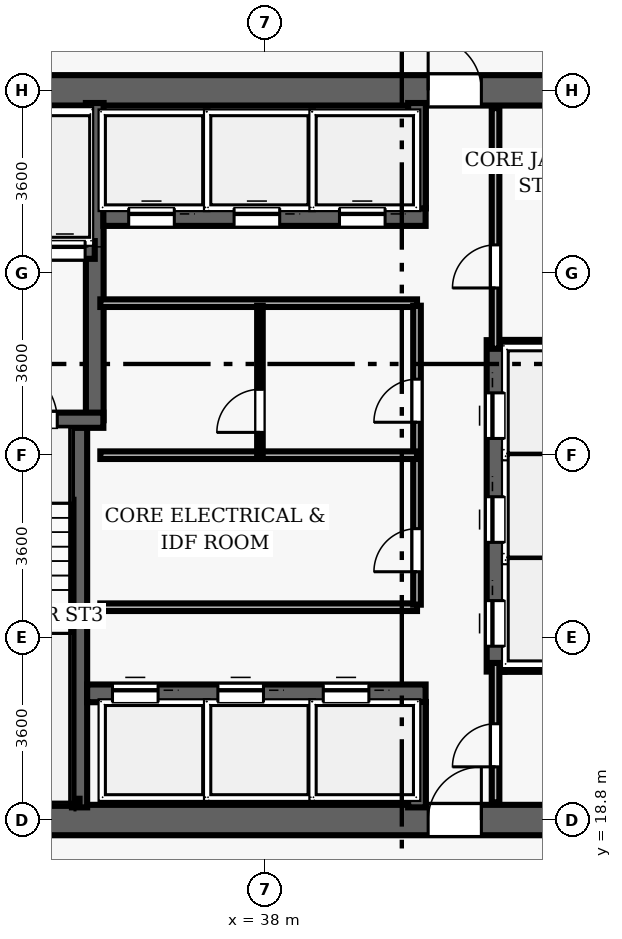
"""IFC4 building model, lengths in metres.
Left out: names, types, materials, properties, quantities, classifications, styles, units other than length and angle.
Written with IfcOpenShell. Run it as: python <this file> out.ifc"""

import sys

from ifc_helpers import new_model, si_unit, direction, frame, frame_2d, origin, place, context, subcontext, project, spatial, rectangle, extrude, element, fill, save


model = new_model("IFC4")
c1 = context("Model", 3, precision=1e-05, world=origin(), true_north=direction((0.0, 1.0)))
c2 = subcontext(c1, "Body", "Model", "MODEL_VIEW")
j1 = project(units=[si_unit("LENGTHUNIT", "METRE"), si_unit("PLANEANGLEUNIT", "RADIAN")], contexts=[c1])
p1 = place(None, origin())
s1 = spatial("IfcSite", under=j1, at=p1, CompositionType="ELEMENT")
p2 = place(p1, origin())
s2 = spatial("IfcBuilding", under=s1, at=p2, CompositionType="ELEMENT")
p3 = place(p2, origin())
s3 = spatial("IfcBuildingStorey", under=s2, at=p3, CompositionType="ELEMENT", Elevation=0.0)
p4 = place(p3, frame((26.7, 18.8, 0.0), z_axis=(0.0, 0.0, 1.0), x_axis=(1.0, 0.0, 0.0)))
e1 = element("IfcWall", 1, at=p4, inside=s3, PredefinedType="SHEAR", context=c2, shape_type="SweptSolid", body=[
    extrude(rectangle(XDim=22.6, YDim=0.6, at=frame_2d((11.3, 0.0))), origin(), (0.0, 0.0, 1.0), 6.6),
])
p5 = place(p4, frame((14.52, 0.0, 0.0)))
e2 = element("IfcOpeningElement", 2, at=p5, cuts=e1, PredefinedType="OPENING", context=c2, shape_type="SweptSolid", body=[
    extrude(rectangle(XDim=1.05, YDim=2.15, at=frame_2d((0.525, 1.075))), frame((0.0, 0.31, 0.0), z_axis=(0.0, -1.0, 0.0), x_axis=(1.0, 0.0, 0.0)), (0.0, 0.0, 1.0), 0.62),
])
p6 = place(p3, frame((26.7, 33.2, 0.0), z_axis=(0.0, 0.0, 1.0), x_axis=(1.0, 0.0, 0.0)))
e3 = element("IfcWall", 3, at=p6, inside=s3, PredefinedType="SHEAR", context=c2, shape_type="SweptSolid", body=[
    extrude(rectangle(XDim=22.6, YDim=0.6, at=frame_2d((11.3, 0.0))), origin(), (0.0, 0.0, 1.0), 6.6),
])
p7 = place(p6, frame((4.62, 0.0, 0.0)))
e4 = element("IfcOpeningElement", 4, at=p7, cuts=e3, PredefinedType="OPENING", context=c2, shape_type="SweptSolid", body=[
    extrude(rectangle(XDim=1.05, YDim=2.15, at=frame_2d((0.525, 1.075))), frame((0.0, 0.31, 0.0), z_axis=(0.0, -1.0, 0.0), x_axis=(1.0, 0.0, 0.0)), (0.0, 0.0, 1.0), 0.62),
])
p8 = place(p6, frame((14.52, 0.0, 0.0)))
e5 = element("IfcOpeningElement", 5, at=p8, cuts=e3, PredefinedType="OPENING", context=c2, shape_type="SweptSolid", body=[
    extrude(rectangle(XDim=1.05, YDim=2.15, at=frame_2d((0.525, 1.075))), frame((0.0, 0.31, 0.0), z_axis=(0.0, -1.0, 0.0), x_axis=(1.0, 0.0, 0.0)), (0.0, 0.0, 1.0), 0.62),
])
p9 = place(p3, frame((34.34, 19.05, 0.0), z_axis=(0.0, 0.0, 1.0), x_axis=(0.0, 1.0, 0.0)))
e6 = element("IfcWall", 6, at=p9, inside=s3, PredefinedType="SHEAR", context=c2, shape_type="SweptSolid", body=[
    extrude(rectangle(XDim=7.5, YDim=0.3, at=frame_2d((3.75, 0.0))), origin(), (0.0, 0.0, 1.0), 6.6),
])
p10 = place(p3, frame((34.64, 26.69, 0.0), z_axis=(0.0, 0.0, 1.0), x_axis=(0.0, 1.0, 0.0)))
e7 = element("IfcWall", 7, at=p10, inside=s3, PredefinedType="SHEAR", context=c2, shape_type="SweptSolid", body=[
    extrude(rectangle(XDim=6.26, YDim=0.35, at=frame_2d((3.13, 0.0))), origin(), (0.0, 0.0, 1.0), 6.6),
])
p11 = place(p3, frame((31.25, 26.69, 0.0), z_axis=(0.0, 0.0, 1.0), x_axis=(1.0, 0.0, 0.0)))
e8 = element("IfcWall", 8, at=p11, inside=s3, PredefinedType="SHEAR", context=c2, shape_type="SweptSolid", body=[
    extrude(rectangle(XDim=3.56, YDim=0.3, at=frame_2d((1.78, 0.0))), origin(), (0.0, 0.0, 1.0), 6.6),
])
p12 = place(p11, frame((1.55, 0.0, 0.0)))
e9 = element("IfcOpeningElement", 9, at=p12, cuts=e8, PredefinedType="OPENING", context=c2, shape_type="SweptSolid", body=[
    extrude(rectangle(XDim=1.1, YDim=2.15, at=frame_2d((0.55, 1.075))), frame((0.0, 0.16, 0.0), z_axis=(0.0, -1.0, 0.0), x_axis=(1.0, 0.0, 0.0)), (0.0, 0.0, 1.0), 0.32),
])
p13 = place(p3, frame((31.3, 19.16, 0.0), z_axis=(0.0, 0.0, 1.0), x_axis=(1.0, 0.0, 0.0)))
e10 = element("IfcWall", 10, at=p13, inside=s3, PredefinedType="SHEAR", context=c2, shape_type="SweptSolid", body=[
    extrude(rectangle(XDim=3.04, YDim=0.12, at=frame_2d((1.52, 0.0))), origin(), (0.0, 0.0, 1.0), 6.6),
])
p14 = place(p3, frame((32.23, 30.05, 0.0), z_axis=(0.0, 0.0, 1.0), x_axis=(1.0, 0.0, 0.0)))
e11 = element("IfcWall", 11, at=p14, inside=s3, PredefinedType="SHEAR", context=c2, shape_type="SweptSolid", body=[
    extrude(rectangle(XDim=2.41, YDim=0.35, at=frame_2d((1.205, 0.0))), origin(), (0.0, 0.0, 1.0), 5.31),
])
p15 = place(p14, frame((0.42, 0.0, 0.0)))
e12 = element("IfcOpeningElement", 12, at=p15, cuts=e11, PredefinedType="OPENING", context=c2, shape_type="SweptSolid", body=[
    extrude(rectangle(XDim=0.8, YDim=2.15, at=frame_2d((0.4, 1.075))), frame((0.0, 0.185, 0.0), z_axis=(0.0, -1.0, 0.0), x_axis=(1.0, 0.0, 0.0)), (0.0, 0.0, 1.0), 0.37),
])
p16 = place(p14, frame((1.42, 0.0, 0.0)))
e13 = element("IfcOpeningElement", 13, at=p16, cuts=e11, PredefinedType="OPENING", context=c2, shape_type="SweptSolid", body=[
    extrude(rectangle(XDim=0.8, YDim=2.15, at=frame_2d((0.4, 1.075))), frame((0.0, 0.185, 0.0), z_axis=(0.0, -1.0, 0.0), x_axis=(1.0, 0.0, 0.0)), (0.0, 0.0, 1.0), 0.37),
])
p17 = place(p3, frame((42.55, 21.73, 0.0), z_axis=(0.0, 0.0, 1.0), x_axis=(0.0, 1.0, 0.0)))
e14 = element("IfcWall", 14, at=p17, inside=s3, PredefinedType="SHEAR", context=c2, shape_type="SweptSolid", body=[
    extrude(rectangle(XDim=6.54, YDim=0.35, at=frame_2d((3.27, 0.0))), origin(), (0.0, 0.0, 1.0), 5.31),
])
p18 = place(p17, frame((0.5, 0.0, 0.0)))
e15 = element("IfcOpeningElement", 15, at=p18, cuts=e14, PredefinedType="OPENING", context=c2, shape_type="SweptSolid", body=[
    extrude(rectangle(XDim=0.9, YDim=2.15, at=frame_2d((0.45, 1.075))), frame((0.0, 0.185, 0.0), z_axis=(0.0, -1.0, 0.0), x_axis=(1.0, 0.0, 0.0)), (0.0, 0.0, 1.0), 0.37),
])
p19 = place(p17, frame((2.55, 0.0, 0.0)))
e16 = element("IfcOpeningElement", 16, at=p19, cuts=e14, PredefinedType="OPENING", context=c2, shape_type="SweptSolid", body=[
    extrude(rectangle(XDim=0.9, YDim=2.15, at=frame_2d((0.45, 1.075))), frame((0.0, 0.185, 0.0), z_axis=(0.0, -1.0, 0.0), x_axis=(1.0, 0.0, 0.0)), (0.0, 0.0, 1.0), 0.37),
])
p20 = place(p17, frame((4.6, 0.0, 0.0)))
e17 = element("IfcOpeningElement", 17, at=p20, cuts=e14, PredefinedType="OPENING", context=c2, shape_type="SweptSolid", body=[
    extrude(rectangle(XDim=0.9, YDim=2.15, at=frame_2d((0.45, 1.075))), frame((0.0, 0.185, 0.0), z_axis=(0.0, -1.0, 0.0), x_axis=(1.0, 0.0, 0.0)), (0.0, 0.0, 1.0), 0.37),
])
for number, where, z_axis, x_axis in (
    (18, (42.72, 21.9, 0.0), (0.0, 0.0, 1.0), (1.0, 0.0, 0.0)),
    (19, (42.72, 28.1, 0.0), (0.0, 0.0, 1.0), (1.0, 0.0, 0.0)),
):
    element("IfcWall", number, at=place(p3, frame(where, z_axis=z_axis, x_axis=x_axis)), inside=s3, PredefinedType="SHEAR", context=c2, shape_type="SweptSolid", body=[
        extrude(rectangle(XDim=2.03, YDim=0.35, at=frame_2d((1.015, 0.0))), origin(), (0.0, 0.0, 1.0), 5.31),
    ])
p21 = place(p3, frame((34.81, 30.7, 0.0), z_axis=(0.0, 0.0, 1.0), x_axis=(1.0, 0.0, 0.0)))
e20 = element("IfcWall", 20, at=p21, inside=s3, PredefinedType="SHEAR", context=c2, shape_type="SweptSolid", body=[
    extrude(rectangle(XDim=6.36, YDim=0.35, at=frame_2d((3.18, 0.0))), origin(), (0.0, 0.0, 1.0), 5.31),
])
p22 = place(p21, frame((0.5, 0.0, 0.0)))
e21 = element("IfcOpeningElement", 21, at=p22, cuts=e20, PredefinedType="OPENING", context=c2, shape_type="SweptSolid", body=[
    extrude(rectangle(XDim=0.9, YDim=2.15, at=frame_2d((0.45, 1.075))), frame((0.0, 0.185, 0.0), z_axis=(0.0, -1.0, 0.0), x_axis=(1.0, 0.0, 0.0)), (0.0, 0.0, 1.0), 0.37),
])
p23 = place(p21, frame((2.58, 0.0, 0.0)))
e22 = element("IfcOpeningElement", 22, at=p23, cuts=e20, PredefinedType="OPENING", context=c2, shape_type="SweptSolid", body=[
    extrude(rectangle(XDim=0.9, YDim=2.15, at=frame_2d((0.45, 1.075))), frame((0.0, 0.185, 0.0), z_axis=(0.0, -1.0, 0.0), x_axis=(1.0, 0.0, 0.0)), (0.0, 0.0, 1.0), 0.37),
])
p24 = place(p21, frame((4.66, 0.0, 0.0)))
e23 = element("IfcOpeningElement", 23, at=p24, cuts=e20, PredefinedType="OPENING", context=c2, shape_type="SweptSolid", body=[
    extrude(rectangle(XDim=0.9, YDim=2.15, at=frame_2d((0.45, 1.075))), frame((0.0, 0.185, 0.0), z_axis=(0.0, -1.0, 0.0), x_axis=(1.0, 0.0, 0.0)), (0.0, 0.0, 1.0), 0.37),
])
p25 = place(p3, frame((41.0, 30.87, 0.0), z_axis=(0.0, 0.0, 1.0), x_axis=(0.0, 1.0, 0.0)))
e24 = element("IfcWall", 24, at=p25, inside=s3, PredefinedType="SHEAR", context=c2, shape_type="SweptSolid", body=[
    extrude(rectangle(XDim=2.08, YDim=0.35, at=frame_2d((1.04, 0.0))), origin(), (0.0, 0.0, 1.0), 5.31),
])
p26 = place(p3, frame((34.49, 21.3, 0.0), z_axis=(0.0, 0.0, 1.0), x_axis=(1.0, 0.0, 0.0)))
e25 = element("IfcWall", 25, at=p26, inside=s3, PredefinedType="SHEAR", context=c2, shape_type="SweptSolid", body=[
    extrude(rectangle(XDim=6.68, YDim=0.35, at=frame_2d((3.34, 0.0))), origin(), (0.0, 0.0, 1.0), 5.31),
])
p27 = place(p26, frame((0.5, 0.0, 0.0)))
e26 = element("IfcOpeningElement", 26, at=p27, cuts=e25, PredefinedType="OPENING", context=c2, shape_type="SweptSolid", body=[
    extrude(rectangle(XDim=0.9, YDim=2.15, at=frame_2d((0.45, 1.075))), frame((0.0, 0.185, 0.0), z_axis=(0.0, -1.0, 0.0), x_axis=(1.0, 0.0, 0.0)), (0.0, 0.0, 1.0), 0.37),
])
p28 = place(p26, frame((2.58, 0.0, 0.0)))
e27 = element("IfcOpeningElement", 27, at=p28, cuts=e25, PredefinedType="OPENING", context=c2, shape_type="SweptSolid", body=[
    extrude(rectangle(XDim=0.9, YDim=2.15, at=frame_2d((0.45, 1.075))), frame((0.0, 0.185, 0.0), z_axis=(0.0, -1.0, 0.0), x_axis=(1.0, 0.0, 0.0)), (0.0, 0.0, 1.0), 0.37),
])
p29 = place(p26, frame((4.66, 0.0, 0.0)))
e28 = element("IfcOpeningElement", 28, at=p29, cuts=e25, PredefinedType="OPENING", context=c2, shape_type="SweptSolid", body=[
    extrude(rectangle(XDim=0.9, YDim=2.15, at=frame_2d((0.45, 1.075))), frame((0.0, 0.185, 0.0), z_axis=(0.0, -1.0, 0.0), x_axis=(1.0, 0.0, 0.0)), (0.0, 0.0, 1.0), 0.37),
])
p30 = place(p3, frame((41.0, 19.05, 0.0), z_axis=(0.0, 0.0, 1.0), x_axis=(0.0, 1.0, 0.0)))
e29 = element("IfcWall", 29, at=p30, inside=s3, PredefinedType="SHEAR", context=c2, shape_type="SweptSolid", body=[
    extrude(rectangle(XDim=2.08, YDim=0.35, at=frame_2d((1.04, 0.0))), origin(), (0.0, 0.0, 1.0), 5.31),
])
for number, where, z_axis, x_axis in (
    (30, (34.75, 29.0, 0.0), (0.0, 0.0, 1.0), (1.0, 0.0, 0.0)),
    (31, (34.75, 23.0, 0.0), (0.0, 0.0, 1.0), (1.0, 0.0, 0.0)),
):
    element("IfcWall", number, at=place(p3, frame(where, z_axis=z_axis, x_axis=x_axis)), inside=s3, PredefinedType="PARTITIONING", context=c2, shape_type="SweptSolid", body=[
        extrude(rectangle(XDim=6.25, YDim=0.15, at=frame_2d((3.125, 0.0))), origin(), (0.0, 0.0, 1.0), 5.31),
    ])
p31 = place(p3, frame((41.0, 23.05, 0.0), z_axis=(0.0, 0.0, 1.0), x_axis=(0.0, 1.0, 0.0)))
e32 = element("IfcWall", 32, at=p31, inside=s3, PredefinedType="PARTITIONING", context=c2, shape_type="SweptSolid", body=[
    extrude(rectangle(XDim=5.9, YDim=0.15, at=frame_2d((2.95, 0.0))), origin(), (0.0, 0.0, 1.0), 5.31),
])
p32 = place(p31, frame((0.65, 0.0, 0.0)))
e33 = element("IfcOpeningElement", 33, at=p32, cuts=e32, PredefinedType="OPENING", context=c2, shape_type="SweptSolid", body=[
    extrude(rectangle(XDim=0.85, YDim=2.1, at=frame_2d((0.425, 1.05))), frame((0.0, 0.085, 0.0), z_axis=(0.0, -1.0, 0.0), x_axis=(1.0, 0.0, 0.0)), (0.0, 0.0, 1.0), 0.17),
])
p33 = place(p31, frame((3.6, 0.0, 0.0)))
e34 = element("IfcOpeningElement", 34, at=p33, cuts=e32, PredefinedType="OPENING", context=c2, shape_type="SweptSolid", body=[
    extrude(rectangle(XDim=0.85, YDim=2.1, at=frame_2d((0.425, 1.05))), frame((0.0, 0.085, 0.0), z_axis=(0.0, -1.0, 0.0), x_axis=(1.0, 0.0, 0.0)), (0.0, 0.0, 1.0), 0.17),
])
p34 = place(p3, frame((34.75, 26.0, 0.0), z_axis=(0.0, 0.0, 1.0), x_axis=(1.0, 0.0, 0.0)))
e35 = element("IfcWall", 35, at=p34, inside=s3, PredefinedType="PARTITIONING", context=c2, shape_type="SweptSolid", body=[
    extrude(rectangle(XDim=6.25, YDim=0.15, at=frame_2d((3.125, 0.0))), origin(), (0.0, 0.0, 1.0), 5.31),
])
p35 = place(p3, frame((37.9, 26.0, 0.0), z_axis=(0.0, 0.0, 1.0), x_axis=(0.0, 1.0, 0.0)))
e36 = element("IfcWall", 36, at=p35, inside=s3, PredefinedType="PARTITIONING", context=c2, shape_type="SweptSolid", body=[
    extrude(rectangle(XDim=2.95, YDim=0.11, at=frame_2d((1.475, 0.0))), origin(), (0.0, 0.0, 1.0), 5.31),
])
p36 = place(p35, frame((0.45, 0.0, 0.0)))
e37 = element("IfcOpeningElement", 37, at=p36, cuts=e36, PredefinedType="OPENING", context=c2, shape_type="SweptSolid", body=[
    extrude(rectangle(XDim=0.85, YDim=2.1, at=frame_2d((0.425, 1.05))), frame((0.0, 0.065, 0.0), z_axis=(0.0, -1.0, 0.0), x_axis=(1.0, 0.0, 0.0)), (0.0, 0.0, 1.0), 0.13),
])
p37 = place(p3, frame((42.55, 28.1, 0.0), z_axis=(0.0, 0.0, 1.0), x_axis=(0.0, 1.0, 0.0)))
e38 = element("IfcWall", 38, at=p37, inside=s3, PredefinedType="PARTITIONING", context=c2, shape_type="SweptSolid", body=[
    extrude(rectangle(XDim=4.75, YDim=0.15, at=frame_2d((2.375, 0.0))), origin(), (0.0, 0.0, 1.0), 5.31),
])
p38 = place(p37, frame((1.2, 0.0, 0.0)))
e39 = element("IfcOpeningElement", 39, at=p38, cuts=e38, PredefinedType="OPENING", context=c2, shape_type="SweptSolid", body=[
    extrude(rectangle(XDim=0.85, YDim=2.1, at=frame_2d((0.425, 1.05))), frame((0.0, 0.085, 0.0), z_axis=(0.0, -1.0, 0.0), x_axis=(1.0, 0.0, 0.0)), (0.0, 0.0, 1.0), 0.17),
])
p39 = place(p3, frame((42.55, 19.15, 0.0), z_axis=(0.0, 0.0, 1.0), x_axis=(0.0, 1.0, 0.0)))
e40 = element("IfcWall", 40, at=p39, inside=s3, PredefinedType="PARTITIONING", context=c2, shape_type="SweptSolid", body=[
    extrude(rectangle(XDim=2.75, YDim=0.15, at=frame_2d((1.375, 0.0))), origin(), (0.0, 0.0, 1.0), 5.31),
])
p40 = place(p39, frame((0.7, 0.0, 0.0)))
e41 = element("IfcOpeningElement", 41, at=p40, cuts=e40, PredefinedType="OPENING", context=c2, shape_type="SweptSolid", body=[
    extrude(rectangle(XDim=0.85, YDim=2.1, at=frame_2d((0.425, 1.05))), frame((0.0, 0.085, 0.0), z_axis=(0.0, -1.0, 0.0), x_axis=(1.0, 0.0, 0.0)), (0.0, 0.0, 1.0), 0.17),
])
p41 = place(p12, origin())
e42 = element("IfcDoor", 42, at=p41, inside=s3, OperationType="SINGLE_SWING_LEFT", PredefinedType="DOOR", context=c2, shape_type="SweptSolid", body=[
    extrude(rectangle(XDim=1.1, YDim=2.15, at=frame_2d((0.55, 1.075))), frame((0.0, 0.025, 0.0), z_axis=(0.0, -1.0, 0.0), x_axis=(1.0, 0.0, 0.0)), (0.0, 0.0, 1.0), 0.05),
])
fill(e9, e42)
p42 = place(p8, origin())
e43 = element("IfcDoor", 43, at=p42, inside=s3, OperationType="SINGLE_SWING_LEFT", PredefinedType="DOOR", context=c2, shape_type="SweptSolid", body=[
    extrude(rectangle(XDim=1.05, YDim=2.15, at=frame_2d((0.525, 1.075))), frame((0.0, 0.025, 0.0), z_axis=(0.0, -1.0, 0.0), x_axis=(1.0, 0.0, 0.0)), (0.0, 0.0, 1.0), 0.05),
])
fill(e5, e43)
p43 = place(p5, origin())
e44 = element("IfcDoor", 44, at=p43, inside=s3, OperationType="SINGLE_SWING_RIGHT", PredefinedType="DOOR", context=c2, shape_type="SweptSolid", body=[
    extrude(rectangle(XDim=1.05, YDim=2.15, at=frame_2d((0.525, 1.075))), frame((0.0, 0.025, 0.0), z_axis=(0.0, -1.0, 0.0), x_axis=(1.0, 0.0, 0.0)), (0.0, 0.0, 1.0), 0.05),
])
fill(e2, e44)
p44 = place(p32, origin())
e45 = element("IfcDoor", 45, at=p44, inside=s3, OperationType="SINGLE_SWING_LEFT", PredefinedType="DOOR", context=c2, shape_type="SweptSolid", body=[
    extrude(rectangle(XDim=0.85, YDim=2.1, at=frame_2d((0.425, 1.05))), frame((0.0, 0.025, 0.0), z_axis=(0.0, -1.0, 0.0), x_axis=(1.0, 0.0, 0.0)), (0.0, 0.0, 1.0), 0.05),
])
fill(e33, e45)
p45 = place(p33, origin())
e46 = element("IfcDoor", 46, at=p45, inside=s3, OperationType="SINGLE_SWING_LEFT", PredefinedType="DOOR", context=c2, shape_type="SweptSolid", body=[
    extrude(rectangle(XDim=0.85, YDim=2.1, at=frame_2d((0.425, 1.05))), frame((0.0, 0.025, 0.0), z_axis=(0.0, -1.0, 0.0), x_axis=(1.0, 0.0, 0.0)), (0.0, 0.0, 1.0), 0.05),
])
fill(e34, e46)
p46 = place(p36, origin())
e47 = element("IfcDoor", 47, at=p46, inside=s3, OperationType="SINGLE_SWING_LEFT", PredefinedType="DOOR", context=c2, shape_type="SweptSolid", body=[
    extrude(rectangle(XDim=0.85, YDim=2.1, at=frame_2d((0.425, 1.05))), frame((0.0, 0.025, 0.0), z_axis=(0.0, -1.0, 0.0), x_axis=(1.0, 0.0, 0.0)), (0.0, 0.0, 1.0), 0.05),
])
fill(e37, e47)
p47 = place(p38, origin())
e48 = element("IfcDoor", 48, at=p47, inside=s3, OperationType="SINGLE_SWING_LEFT", PredefinedType="DOOR", context=c2, shape_type="SweptSolid", body=[
    extrude(rectangle(XDim=0.85, YDim=2.1, at=frame_2d((0.425, 1.05))), frame((0.0, 0.025, 0.0), z_axis=(0.0, -1.0, 0.0), x_axis=(1.0, 0.0, 0.0)), (0.0, 0.0, 1.0), 0.05),
])
fill(e39, e48)
p48 = place(p40, origin())
e49 = element("IfcDoor", 49, at=p48, inside=s3, OperationType="SINGLE_SWING_LEFT", PredefinedType="DOOR", context=c2, shape_type="SweptSolid", body=[
    extrude(rectangle(XDim=0.85, YDim=2.1, at=frame_2d((0.425, 1.05))), frame((0.0, 0.025, 0.0), z_axis=(0.0, -1.0, 0.0), x_axis=(1.0, 0.0, 0.0)), (0.0, 0.0, 1.0), 0.05),
])
fill(e41, e49)
p49 = place(p22, origin())
e50 = element("IfcDoor", 50, at=p49, inside=s3, OperationType="SLIDING_TO_LEFT", PredefinedType="DOOR", context=c2, shape_type="SweptSolid", body=[
    extrude(rectangle(XDim=0.9, YDim=2.15, at=frame_2d((0.45, 1.075))), frame((0.0, 0.025, 0.0), z_axis=(0.0, -1.0, 0.0), x_axis=(1.0, 0.0, 0.0)), (0.0, 0.0, 1.0), 0.05),
])
fill(e21, e50)
p50 = place(p23, origin())
e51 = element("IfcDoor", 51, at=p50, inside=s3, OperationType="SLIDING_TO_LEFT", PredefinedType="DOOR", context=c2, shape_type="SweptSolid", body=[
    extrude(rectangle(XDim=0.9, YDim=2.15, at=frame_2d((0.45, 1.075))), frame((0.0, 0.025, 0.0), z_axis=(0.0, -1.0, 0.0), x_axis=(1.0, 0.0, 0.0)), (0.0, 0.0, 1.0), 0.05),
])
fill(e22, e51)
p51 = place(p24, origin())
e52 = element("IfcDoor", 52, at=p51, inside=s3, OperationType="SLIDING_TO_LEFT", PredefinedType="DOOR", context=c2, shape_type="SweptSolid", body=[
    extrude(rectangle(XDim=0.9, YDim=2.15, at=frame_2d((0.45, 1.075))), frame((0.0, 0.025, 0.0), z_axis=(0.0, -1.0, 0.0), x_axis=(1.0, 0.0, 0.0)), (0.0, 0.0, 1.0), 0.05),
])
fill(e23, e52)
p52 = place(p27, origin())
e53 = element("IfcDoor", 53, at=p52, inside=s3, OperationType="SLIDING_TO_LEFT", PredefinedType="DOOR", context=c2, shape_type="SweptSolid", body=[
    extrude(rectangle(XDim=0.9, YDim=2.15, at=frame_2d((0.45, 1.075))), frame((0.0, 0.025, 0.0), z_axis=(0.0, -1.0, 0.0), x_axis=(1.0, 0.0, 0.0)), (0.0, 0.0, 1.0), 0.05),
])
fill(e26, e53)
p53 = place(p28, origin())
e54 = element("IfcDoor", 54, at=p53, inside=s3, OperationType="SLIDING_TO_LEFT", PredefinedType="DOOR", context=c2, shape_type="SweptSolid", body=[
    extrude(rectangle(XDim=0.9, YDim=2.15, at=frame_2d((0.45, 1.075))), frame((0.0, 0.025, 0.0), z_axis=(0.0, -1.0, 0.0), x_axis=(1.0, 0.0, 0.0)), (0.0, 0.0, 1.0), 0.05),
])
fill(e27, e54)
p54 = place(p29, origin())
e55 = element("IfcDoor", 55, at=p54, inside=s3, OperationType="SLIDING_TO_LEFT", PredefinedType="DOOR", context=c2, shape_type="SweptSolid", body=[
    extrude(rectangle(XDim=0.9, YDim=2.15, at=frame_2d((0.45, 1.075))), frame((0.0, 0.025, 0.0), z_axis=(0.0, -1.0, 0.0), x_axis=(1.0, 0.0, 0.0)), (0.0, 0.0, 1.0), 0.05),
])
fill(e28, e55)
p55 = place(p18, origin())
e56 = element("IfcDoor", 56, at=p55, inside=s3, OperationType="SLIDING_TO_LEFT", PredefinedType="DOOR", context=c2, shape_type="SweptSolid", body=[
    extrude(rectangle(XDim=0.9, YDim=2.15, at=frame_2d((0.45, 1.075))), frame((0.0, 0.025, 0.0), z_axis=(0.0, -1.0, 0.0), x_axis=(1.0, 0.0, 0.0)), (0.0, 0.0, 1.0), 0.05),
])
fill(e15, e56)
p56 = place(p19, origin())
e57 = element("IfcDoor", 57, at=p56, inside=s3, OperationType="SLIDING_TO_LEFT", PredefinedType="DOOR", context=c2, shape_type="SweptSolid", body=[
    extrude(rectangle(XDim=0.9, YDim=2.15, at=frame_2d((0.45, 1.075))), frame((0.0, 0.025, 0.0), z_axis=(0.0, -1.0, 0.0), x_axis=(1.0, 0.0, 0.0)), (0.0, 0.0, 1.0), 0.05),
])
fill(e16, e57)
p57 = place(p20, origin())
e58 = element("IfcDoor", 58, at=p57, inside=s3, OperationType="SLIDING_TO_LEFT", PredefinedType="DOOR", context=c2, shape_type="SweptSolid", body=[
    extrude(rectangle(XDim=0.9, YDim=2.15, at=frame_2d((0.45, 1.075))), frame((0.0, 0.025, 0.0), z_axis=(0.0, -1.0, 0.0), x_axis=(1.0, 0.0, 0.0)), (0.0, 0.0, 1.0), 0.05),
])
fill(e17, e58)
p58 = place(p16, origin())
e59 = element("IfcDoor", 59, at=p58, inside=s3, OperationType="SLIDING_TO_LEFT", PredefinedType="DOOR", context=c2, shape_type="SweptSolid", body=[
    extrude(rectangle(XDim=0.8, YDim=2.15, at=frame_2d((0.4, 1.075))), frame((0.0, 0.025, 0.0), z_axis=(0.0, -1.0, 0.0), x_axis=(1.0, 0.0, 0.0)), (0.0, 0.0, 1.0), 0.05),
])
fill(e13, e59)
save(model, sys.argv[1])
